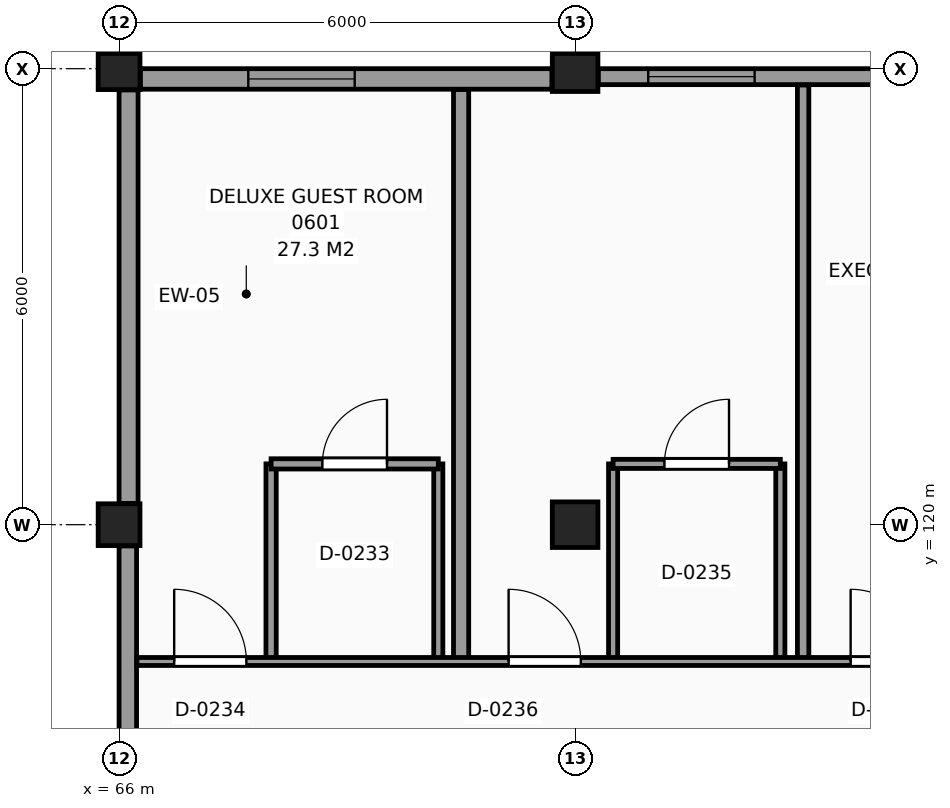
"""IFC4 building model, lengths in metres.
Left out: names, types, materials, properties, quantities, classifications, styles, units other than length and angle.
Written with IfcOpenShell. Run it as: python <this file> out.ifc"""

import sys

from ifc_helpers import new_model, si_unit, direction, frame, frame_2d, origin, origin_2d, place, context, subcontext, project, spatial, rectangle, extrude, element, fill, save


model = new_model("IFC4")
c1 = context("Model", 3, precision=1e-05, world=origin(), true_north=direction((0.0, 1.0)))
c2 = subcontext(c1, "Body", "Model", "MODEL_VIEW")
j1 = project(units=[si_unit("LENGTHUNIT", "METRE"), si_unit("PLANEANGLEUNIT", "RADIAN")], contexts=[c1])
p1 = place(None, origin())
s1 = spatial("IfcSite", under=j1, at=p1, CompositionType="ELEMENT")
p2 = place(p1, origin())
s2 = spatial("IfcBuilding", under=s1, at=p2, CompositionType="ELEMENT")
p3 = place(p2, frame((0.0, 0.0, 28.2)))
s3 = spatial("IfcBuildingStorey", under=s2, at=p3, CompositionType="ELEMENT", Elevation=28.2)
for number, where, z_axis, x_axis in (
    (1, (66.0, 120.0, 0.0), (0.0, 0.0, 1.0), (1.0, 0.0, 0.0)),
    (2, (66.0, 126.0, 0.0), (0.0, 0.0, 1.0), (1.0, 0.0, 0.0)),
):
    element("IfcColumn", number, at=place(p3, frame(where, z_axis=z_axis, x_axis=x_axis)), inside=s3, PredefinedType="COLUMN", context=c2, shape_type="SweptSolid", body=[
        extrude(rectangle(XDim=0.55, YDim=0.55, at=origin_2d()), origin(), (0.0, 0.0, 1.0), 3.3),
    ])
for number, where, z_axis, x_axis in (
    (3, (72.0, 120.0, 0.0), (0.0, 0.0, 1.0), (1.0, 0.0, 0.0)),
    (4, (72.0, 126.0, 0.0), (0.0, 0.0, 1.0), (1.0, 0.0, 0.0)),
):
    element("IfcColumn", number, at=place(p3, frame(where, z_axis=z_axis, x_axis=x_axis)), inside=s3, PredefinedType="COLUMN", context=c2, shape_type="SweptSolid", body=[
        extrude(rectangle(XDim=0.6, YDim=0.6, at=origin_2d()), origin(), (0.0, 0.0, 1.0), 3.3),
    ])
p4 = place(p3, frame((77.72, 125.895, 0.0), z_axis=(0.0, 0.0, 1.0), x_axis=(-1.0, 0.0, 0.0)))
e5 = element("IfcWall", 5, at=p4, inside=s3, PredefinedType="SOLIDWALL", context=c2, shape_type="SweptSolid", body=[
    extrude(rectangle(XDim=5.415, YDim=0.21, at=frame_2d((2.708, 0.0))), origin(), (0.0, 0.0, 1.0), 2.43),
])
p5 = place(p4, frame((3.358, 0.0, 0.8)))
e6 = element("IfcOpeningElement", 6, at=p5, cuts=e5, PredefinedType="OPENING", context=c2, shape_type="SweptSolid", body=[
    extrude(rectangle(XDim=1.4, YDim=1.4, at=frame_2d((0.7, 0.7))), frame((0.0, 0.115, 0.0), z_axis=(0.0, -1.0, 0.0), x_axis=(1.0, 0.0, 0.0)), (0.0, 0.0, 1.0), 0.23),
])
p6 = place(p3, frame((71.695, 125.865, 0.0), z_axis=(0.0, 0.0, 1.0), x_axis=(-1.0, 0.0, 0.0)))
e7 = element("IfcWall", 7, at=p6, inside=s3, PredefinedType="SOLIDWALL", context=c2, shape_type="SweptSolid", body=[
    extrude(rectangle(XDim=5.415, YDim=0.27, at=frame_2d((2.708, 0.0))), origin(), (0.0, 0.0, 1.0), 2.43),
])
p7 = place(p6, frame((2.595, 0.0, 0.8)))
e8 = element("IfcOpeningElement", 8, at=p7, cuts=e7, PredefinedType="OPENING", context=c2, shape_type="SweptSolid", body=[
    extrude(rectangle(XDim=1.4, YDim=1.4, at=frame_2d((0.7, 0.7))), frame((0.0, 0.145, 0.0), z_axis=(0.0, -1.0, 0.0), x_axis=(1.0, 0.0, 0.0)), (0.0, 0.0, 1.0), 0.29),
])
p8 = place(p3, frame((66.125, 125.72, 0.0), z_axis=(0.0, 0.0, 1.0), x_axis=(0.0, -1.0, 0.0)))
e9 = element("IfcWall", 9, at=p8, inside=s3, PredefinedType="SOLIDWALL", context=c2, shape_type="SweptSolid", body=[
    extrude(rectangle(XDim=5.44, YDim=0.25, at=frame_2d((2.72, 0.0))), origin(), (0.0, 0.0, 1.0), 2.28),
])
p9 = place(p3, frame((66.115, 119.72, 0.0), z_axis=(0.0, 0.0, 1.0), x_axis=(0.0, -1.0, 0.0)))
e10 = element("IfcWall", 10, at=p9, inside=s3, PredefinedType="SOLIDWALL", context=c2, shape_type="SweptSolid", body=[
    extrude(rectangle(XDim=5.44, YDim=0.23, at=frame_2d((2.72, 0.0))), origin(), (0.0, 0.0, 1.0), 2.28),
])
p10 = place(p3, frame((68.0, 118.2, 0.0), z_axis=(0.0, 0.0, 1.0), x_axis=(0.0, 1.0, 0.0)))
e11 = element("IfcWall", 11, at=p10, inside=s3, PredefinedType="PARTITIONING", context=c2, shape_type="SweptSolid", body=[
    extrude(rectangle(XDim=2.6, YDim=0.135, at=frame_2d((1.3, 0.0))), origin(), (0.0, 0.0, 1.0), 3.08),
])
p11 = place(p3, frame((70.2, 118.2, 0.0), z_axis=(0.0, 0.0, 1.0), x_axis=(0.0, 1.0, 0.0)))
e12 = element("IfcWall", 12, at=p11, inside=s3, PredefinedType="PARTITIONING", context=c2, shape_type="SweptSolid", body=[
    extrude(rectangle(XDim=2.6, YDim=0.12, at=frame_2d((1.3, 0.0))), origin(), (0.0, 0.0, 1.0), 3.08),
])
p12 = place(p3, frame((70.5, 118.2, 0.0), z_axis=(0.0, 0.0, 1.0), x_axis=(0.0, 1.0, 0.0)))
e13 = element("IfcWall", 13, at=p12, inside=s3, PredefinedType="PARTITIONING", context=c2, shape_type="SweptSolid", body=[
    extrude(rectangle(XDim=7.525, YDim=0.2, at=frame_2d((3.763, 0.0))), origin(), (0.0, 0.0, 1.0), 3.08),
])
for number, where, z_axis, x_axis in (
    (14, (72.5, 118.2, 0.0), (0.0, 0.0, 1.0), (0.0, 1.0, 0.0)),
    (15, (74.7, 118.2, 0.0), (0.0, 0.0, 1.0), (0.0, 1.0, 0.0)),
):
    element("IfcWall", number, at=place(p3, frame(where, z_axis=z_axis, x_axis=x_axis)), inside=s3, PredefinedType="PARTITIONING", context=c2, shape_type="SweptSolid", body=[
        extrude(rectangle(XDim=2.6, YDim=0.12, at=frame_2d((1.3, 0.0))), origin(), (0.0, 0.0, 1.0), 3.08),
    ])
p13 = place(p3, frame((75.0, 118.2, 0.0), z_axis=(0.0, 0.0, 1.0), x_axis=(0.0, 1.0, 0.0)))
e16 = element("IfcWall", 16, at=p13, inside=s3, PredefinedType="PARTITIONING", context=c2, shape_type="SweptSolid", body=[
    extrude(rectangle(XDim=7.585, YDim=0.15, at=frame_2d((3.792, 0.0))), origin(), (0.0, 0.0, 1.0), 3.08),
])
p14 = place(p3, frame((66.235, 118.2, 0.0), z_axis=(0.0, 0.0, 1.0), x_axis=(1.0, 0.0, 0.0)))
e17 = element("IfcWall", 17, at=p14, inside=s3, PredefinedType="PARTITIONING", context=c2, shape_type="SweptSolid", body=[
    extrude(rectangle(XDim=110.265, YDim=0.105, at=frame_2d((55.132, 0.0))), origin(), (0.0, 0.0, 1.0), 3.08),
])
p15 = place(p14, frame((0.49, 0.0, 0.0)))
e18 = element("IfcOpeningElement", 18, at=p15, cuts=e17, PredefinedType="OPENING", context=c2, shape_type="SweptSolid", body=[
    extrude(rectangle(XDim=0.95, YDim=2.1, at=frame_2d((0.475, 1.05))), frame((0.0, 0.062, 0.0), z_axis=(0.0, -1.0, 0.0), x_axis=(1.0, 0.0, 0.0)), (0.0, 0.0, 1.0), 0.125),
])
p16 = place(p14, frame((4.89, 0.0, 0.0)))
e19 = element("IfcOpeningElement", 19, at=p16, cuts=e17, PredefinedType="OPENING", context=c2, shape_type="SweptSolid", body=[
    extrude(rectangle(XDim=0.95, YDim=2.1, at=frame_2d((0.475, 1.05))), frame((0.0, 0.062, 0.0), z_axis=(0.0, -1.0, 0.0), x_axis=(1.0, 0.0, 0.0)), (0.0, 0.0, 1.0), 0.125),
])
p17 = place(p14, frame((9.39, 0.0, 0.0)))
e20 = element("IfcOpeningElement", 20, at=p17, cuts=e17, PredefinedType="OPENING", context=c2, shape_type="SweptSolid", body=[
    extrude(rectangle(XDim=0.95, YDim=2.1, at=frame_2d((0.475, 1.05))), frame((0.0, 0.062, 0.0), z_axis=(0.0, -1.0, 0.0), x_axis=(1.0, 0.0, 0.0)), (0.0, 0.0, 1.0), 0.125),
])
p18 = place(p14, frame((24.09, 0.0, 0.0)))
e21 = element("IfcOpeningElement", 21, at=p18, cuts=e17, PredefinedType="OPENING", context=c2, shape_type="SweptSolid", body=[
    extrude(rectangle(XDim=0.95, YDim=2.1, at=frame_2d((0.475, 1.05))), frame((0.0, 0.062, 0.0), z_axis=(0.0, -1.0, 0.0), x_axis=(1.0, 0.0, 0.0)), (0.0, 0.0, 1.0), 0.125),
])
p19 = place(p14, frame((32.34, 0.0, 0.0)))
e22 = element("IfcOpeningElement", 22, at=p19, cuts=e17, PredefinedType="OPENING", context=c2, shape_type="SweptSolid", body=[
    extrude(rectangle(XDim=0.95, YDim=2.1, at=frame_2d((0.475, 1.05))), frame((0.0, 0.062, 0.0), z_axis=(0.0, -1.0, 0.0), x_axis=(1.0, 0.0, 0.0)), (0.0, 0.0, 1.0), 0.125),
])
p20 = place(p14, frame((34.89, 0.0, 0.0)))
e23 = element("IfcOpeningElement", 23, at=p20, cuts=e17, PredefinedType="OPENING", context=c2, shape_type="SweptSolid", body=[
    extrude(rectangle(XDim=0.95, YDim=2.1, at=frame_2d((0.475, 1.05))), frame((0.0, 0.062, 0.0), z_axis=(0.0, -1.0, 0.0), x_axis=(1.0, 0.0, 0.0)), (0.0, 0.0, 1.0), 0.125),
])
p21 = place(p14, frame((42.09, 0.0, 0.0)))
e24 = element("IfcOpeningElement", 24, at=p21, cuts=e17, PredefinedType="OPENING", context=c2, shape_type="SweptSolid", body=[
    extrude(rectangle(XDim=0.95, YDim=2.1, at=frame_2d((0.475, 1.05))), frame((0.0, 0.062, 0.0), z_axis=(0.0, -1.0, 0.0), x_axis=(1.0, 0.0, 0.0)), (0.0, 0.0, 1.0), 0.125),
])
p22 = place(p14, frame((46.29, 0.0, 0.0)))
e25 = element("IfcOpeningElement", 25, at=p22, cuts=e17, PredefinedType="OPENING", context=c2, shape_type="SweptSolid", body=[
    extrude(rectangle(XDim=0.95, YDim=2.1, at=frame_2d((0.475, 1.05))), frame((0.0, 0.062, 0.0), z_axis=(0.0, -1.0, 0.0), x_axis=(1.0, 0.0, 0.0)), (0.0, 0.0, 1.0), 0.125),
])
p23 = place(p14, frame((48.49, 0.0, 0.0)))
e26 = element("IfcOpeningElement", 26, at=p23, cuts=e17, PredefinedType="OPENING", context=c2, shape_type="SweptSolid", body=[
    extrude(rectangle(XDim=0.95, YDim=2.1, at=frame_2d((0.475, 1.05))), frame((0.0, 0.062, 0.0), z_axis=(0.0, -1.0, 0.0), x_axis=(1.0, 0.0, 0.0)), (0.0, 0.0, 1.0), 0.125),
])
p24 = place(p14, frame((54.49, 0.0, 0.0)))
e27 = element("IfcOpeningElement", 27, at=p24, cuts=e17, PredefinedType="OPENING", context=c2, shape_type="SweptSolid", body=[
    extrude(rectangle(XDim=0.95, YDim=2.1, at=frame_2d((0.475, 1.05))), frame((0.0, 0.062, 0.0), z_axis=(0.0, -1.0, 0.0), x_axis=(1.0, 0.0, 0.0)), (0.0, 0.0, 1.0), 0.125),
])
p25 = place(p14, frame((64.29, 0.0, 0.0)))
e28 = element("IfcOpeningElement", 28, at=p25, cuts=e17, PredefinedType="OPENING", context=c2, shape_type="SweptSolid", body=[
    extrude(rectangle(XDim=0.95, YDim=2.1, at=frame_2d((0.475, 1.05))), frame((0.0, 0.062, 0.0), z_axis=(0.0, -1.0, 0.0), x_axis=(1.0, 0.0, 0.0)), (0.0, 0.0, 1.0), 0.125),
])
p26 = place(p14, frame((66.49, 0.0, 0.0)))
e29 = element("IfcOpeningElement", 29, at=p26, cuts=e17, PredefinedType="OPENING", context=c2, shape_type="SweptSolid", body=[
    extrude(rectangle(XDim=0.95, YDim=2.1, at=frame_2d((0.475, 1.05))), frame((0.0, 0.062, 0.0), z_axis=(0.0, -1.0, 0.0), x_axis=(1.0, 0.0, 0.0)), (0.0, 0.0, 1.0), 0.125),
])
p27 = place(p14, frame((70.89, 0.0, 0.0)))
e30 = element("IfcOpeningElement", 30, at=p27, cuts=e17, PredefinedType="OPENING", context=c2, shape_type="SweptSolid", body=[
    extrude(rectangle(XDim=0.95, YDim=2.1, at=frame_2d((0.475, 1.05))), frame((0.0, 0.062, 0.0), z_axis=(0.0, -1.0, 0.0), x_axis=(1.0, 0.0, 0.0)), (0.0, 0.0, 1.0), 0.125),
])
p28 = place(p14, frame((78.09, 0.0, 0.0)))
e31 = element("IfcOpeningElement", 31, at=p28, cuts=e17, PredefinedType="OPENING", context=c2, shape_type="SweptSolid", body=[
    extrude(rectangle(XDim=0.95, YDim=2.1, at=frame_2d((0.475, 1.05))), frame((0.0, 0.062, 0.0), z_axis=(0.0, -1.0, 0.0), x_axis=(1.0, 0.0, 0.0)), (0.0, 0.0, 1.0), 0.125),
])
p29 = place(p14, frame((86.34, 0.0, 0.0)))
e32 = element("IfcOpeningElement", 32, at=p29, cuts=e17, PredefinedType="OPENING", context=c2, shape_type="SweptSolid", body=[
    extrude(rectangle(XDim=0.95, YDim=2.1, at=frame_2d((0.475, 1.05))), frame((0.0, 0.062, 0.0), z_axis=(0.0, -1.0, 0.0), x_axis=(1.0, 0.0, 0.0)), (0.0, 0.0, 1.0), 0.125),
])
p30 = place(p14, frame((88.89, 0.0, 0.0)))
e33 = element("IfcOpeningElement", 33, at=p30, cuts=e17, PredefinedType="OPENING", context=c2, shape_type="SweptSolid", body=[
    extrude(rectangle(XDim=0.95, YDim=2.1, at=frame_2d((0.475, 1.05))), frame((0.0, 0.062, 0.0), z_axis=(0.0, -1.0, 0.0), x_axis=(1.0, 0.0, 0.0)), (0.0, 0.0, 1.0), 0.125),
])
p31 = place(p14, frame((93.39, 0.0, 0.0)))
e34 = element("IfcOpeningElement", 34, at=p31, cuts=e17, PredefinedType="OPENING", context=c2, shape_type="SweptSolid", body=[
    extrude(rectangle(XDim=0.95, YDim=2.1, at=frame_2d((0.475, 1.05))), frame((0.0, 0.062, 0.0), z_axis=(0.0, -1.0, 0.0), x_axis=(1.0, 0.0, 0.0)), (0.0, 0.0, 1.0), 0.125),
])
p32 = place(p14, frame((104.99, 0.0, 0.0)))
e35 = element("IfcOpeningElement", 35, at=p32, cuts=e17, PredefinedType="OPENING", context=c2, shape_type="SweptSolid", body=[
    extrude(rectangle(XDim=0.95, YDim=2.1, at=frame_2d((0.475, 1.05))), frame((0.0, 0.062, 0.0), z_axis=(0.0, -1.0, 0.0), x_axis=(1.0, 0.0, 0.0)), (0.0, 0.0, 1.0), 0.125),
])
p33 = place(p3, frame((68.0, 120.8, 0.0), z_axis=(0.0, 0.0, 1.0), x_axis=(1.0, 0.0, 0.0)))
e36 = element("IfcWall", 36, at=p33, inside=s3, PredefinedType="PARTITIONING", context=c2, shape_type="SweptSolid", body=[
    extrude(rectangle(XDim=2.2, YDim=0.135, at=frame_2d((1.1, 0.0))), origin(), (0.0, 0.0, 1.0), 3.08),
])
p34 = place(p33, frame((0.675, 0.0, 0.0)))
e37 = element("IfcOpeningElement", 37, at=p34, cuts=e36, PredefinedType="OPENING", context=c2, shape_type="SweptSolid", body=[
    extrude(rectangle(XDim=0.85, YDim=2.1, at=frame_2d((0.425, 1.05))), frame((0.0, 0.078, 0.0), z_axis=(0.0, -1.0, 0.0), x_axis=(1.0, 0.0, 0.0)), (0.0, 0.0, 1.0), 0.155),
])
p35 = place(p3, frame((72.5, 120.8, 0.0), z_axis=(0.0, 0.0, 1.0), x_axis=(1.0, 0.0, 0.0)))
e38 = element("IfcWall", 38, at=p35, inside=s3, PredefinedType="PARTITIONING", context=c2, shape_type="SweptSolid", body=[
    extrude(rectangle(XDim=2.2, YDim=0.12, at=frame_2d((1.1, 0.0))), origin(), (0.0, 0.0, 1.0), 3.08),
])
p36 = place(p35, frame((0.675, 0.0, 0.0)))
e39 = element("IfcOpeningElement", 39, at=p36, cuts=e38, PredefinedType="OPENING", context=c2, shape_type="SweptSolid", body=[
    extrude(rectangle(XDim=0.85, YDim=2.1, at=frame_2d((0.425, 1.05))), frame((0.0, 0.07, 0.0), z_axis=(0.0, -1.0, 0.0), x_axis=(1.0, 0.0, 0.0)), (0.0, 0.0, 1.0), 0.14),
])
p37 = place(p7, origin())
e40 = element("IfcWindow", 40, at=p37, inside=s3, PartitioningType="SINGLE_PANEL", PredefinedType="WINDOW", context=c2, shape_type="SweptSolid", body=[
    extrude(rectangle(XDim=1.4, YDim=1.4, at=frame_2d((0.7, 0.7))), frame((0.0, 0.03, 0.0), z_axis=(0.0, -1.0, 0.0), x_axis=(1.0, 0.0, 0.0)), (0.0, 0.0, 1.0), 0.06),
])
fill(e8, e40)
p38 = place(p5, origin())
e41 = element("IfcWindow", 41, at=p38, inside=s3, PartitioningType="SINGLE_PANEL", PredefinedType="WINDOW", context=c2, shape_type="SweptSolid", body=[
    extrude(rectangle(XDim=1.4, YDim=1.4, at=frame_2d((0.7, 0.7))), frame((0.0, 0.03, 0.0), z_axis=(0.0, -1.0, 0.0), x_axis=(1.0, 0.0, 0.0)), (0.0, 0.0, 1.0), 0.06),
])
fill(e6, e41)
p39 = place(p34, origin())
e42 = element("IfcDoor", 42, at=p39, inside=s3, OperationType="SINGLE_SWING_RIGHT", PredefinedType="DOOR", context=c2, shape_type="SweptSolid", body=[
    extrude(rectangle(XDim=0.85, YDim=2.1, at=frame_2d((0.425, 1.05))), frame((0.0, 0.025, 0.0), z_axis=(0.0, -1.0, 0.0), x_axis=(1.0, 0.0, 0.0)), (0.0, 0.0, 1.0), 0.05),
])
fill(e37, e42)
p40 = place(p15, origin())
e43 = element("IfcDoor", 43, at=p40, inside=s3, OperationType="SINGLE_SWING_LEFT", PredefinedType="DOOR", context=c2, shape_type="SweptSolid", body=[
    extrude(rectangle(XDim=0.95, YDim=2.1, at=frame_2d((0.475, 1.05))), frame((0.0, 0.025, 0.0), z_axis=(0.0, -1.0, 0.0), x_axis=(1.0, 0.0, 0.0)), (0.0, 0.0, 1.0), 0.05),
])
fill(e18, e43)
p41 = place(p36, origin())
e44 = element("IfcDoor", 44, at=p41, inside=s3, OperationType="SINGLE_SWING_RIGHT", PredefinedType="DOOR", context=c2, shape_type="SweptSolid", body=[
    extrude(rectangle(XDim=0.85, YDim=2.1, at=frame_2d((0.425, 1.05))), frame((0.0, 0.025, 0.0), z_axis=(0.0, -1.0, 0.0), x_axis=(1.0, 0.0, 0.0)), (0.0, 0.0, 1.0), 0.05),
])
fill(e39, e44)
p42 = place(p16, origin())
e45 = element("IfcDoor", 45, at=p42, inside=s3, OperationType="SINGLE_SWING_LEFT", PredefinedType="DOOR", context=c2, shape_type="SweptSolid", body=[
    extrude(rectangle(XDim=0.95, YDim=2.1, at=frame_2d((0.475, 1.05))), frame((0.0, 0.025, 0.0), z_axis=(0.0, -1.0, 0.0), x_axis=(1.0, 0.0, 0.0)), (0.0, 0.0, 1.0), 0.05),
])
fill(e19, e45)
p43 = place(p17, origin())
e46 = element("IfcDoor", 46, at=p43, inside=s3, OperationType="SINGLE_SWING_LEFT", PredefinedType="DOOR", context=c2, shape_type="SweptSolid", body=[
    extrude(rectangle(XDim=0.95, YDim=2.1, at=frame_2d((0.475, 1.05))), frame((0.0, 0.025, 0.0), z_axis=(0.0, -1.0, 0.0), x_axis=(1.0, 0.0, 0.0)), (0.0, 0.0, 1.0), 0.05),
])
fill(e20, e46)
save(model, sys.argv[1])
